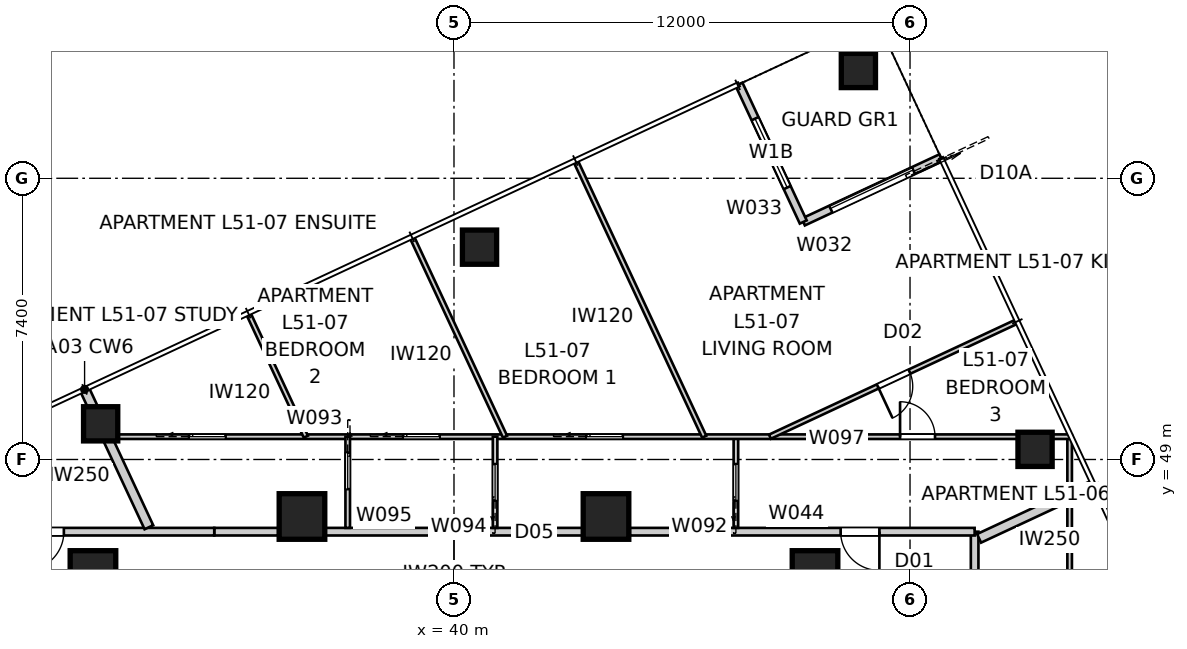
"""IFC4 building model, lengths in metres.
Left out: names, types, materials, properties, quantities, classifications, styles, units other than length and angle.
Written with IfcOpenShell. Run it as: python <this file> out.ifc"""

import sys

from ifc_helpers import new_model, si_unit, direction, frame, frame_2d, origin, origin_2d, place, context, subcontext, project, spatial, rectangle, extrude, element, fill, save


model = new_model("IFC4")
c1 = context("Model", 3, precision=1e-05, world=origin(), true_north=direction((0.0, 1.0)))
c2 = subcontext(c1, "Body", "Model", "MODEL_VIEW")
j1 = project(units=[si_unit("LENGTHUNIT", "METRE"), si_unit("PLANEANGLEUNIT", "RADIAN")], contexts=[c1])
p1 = place(None, origin())
s1 = spatial("IfcSite", under=j1, at=p1, CompositionType="ELEMENT")
p2 = place(p1, origin())
s2 = spatial("IfcBuilding", under=s1, at=p2, CompositionType="ELEMENT")
p3 = place(p2, frame((0.0, 0.0, 186.2)))
s3 = spatial("IfcBuildingStorey", under=s2, at=p3, CompositionType="ELEMENT", Elevation=186.2)
for number, where, z_axis, x_axis in (
    (1, (55.29, 49.267, 0.0), (0.0, 0.0, 1.0), (1.0, 0.0, 0.0)),
    (2, (50.641, 59.236, 0.0), (0.0, 0.0, 1.0), (1.0, 0.0, 0.0)),
    (3, (40.672, 54.588, 0.0), (0.0, 0.0, 1.0), (1.0, 0.0, 0.0)),
    (4, (30.702, 49.939, 0.0), (0.0, 0.0, 1.0), (1.0, 0.0, 0.0)),
):
    element("IfcColumn", number, at=place(p3, frame(where, z_axis=z_axis, x_axis=x_axis)), inside=s3, PredefinedType="COLUMN", context=c2, shape_type="SweptSolid", body=[
        extrude(rectangle(XDim=0.9, YDim=0.9, at=origin_2d()), origin(), (0.0, 0.0, 1.0), 3.4),
    ])
for number, where, z_axis, x_axis in (
    (5, (49.5, 46.0, 0.0), (0.0, 0.0, 1.0), (1.0, 0.0, 0.0)),
    (6, (44.0, 47.5, 0.0), (0.0, 0.0, 1.0), (1.0, 0.0, 0.0)),
    (7, (36.0, 47.5, 0.0), (0.0, 0.0, 1.0), (1.0, 0.0, 0.0)),
    (8, (30.5, 46.0, 0.0), (0.0, 0.0, 1.0), (1.0, 0.0, 0.0)),
):
    element("IfcColumn", number, at=place(p3, frame(where, z_axis=z_axis, x_axis=x_axis)), inside=s3, PredefinedType="COLUMN", context=c2, shape_type="SweptSolid", body=[
        extrude(rectangle(XDim=1.2, YDim=1.2, at=origin_2d()), origin(), (0.0, 0.0, 1.0), 3.4),
    ])
p4 = place(p3, frame((52.815, 56.94, 0.0), z_axis=(0.0, 0.0, 1.0), x_axis=(-0.906289140828, -0.422658246362, 0.0)))
e9 = element("IfcWall", 9, at=p4, inside=s3, PredefinedType="SOLIDWALL", context=c2, shape_type="SweptSolid", body=[
    extrude(rectangle(XDim=4.0, YDim=0.2, at=frame_2d((2.0, 0.0))), origin(), (0.0, 0.0, 1.0), 3.25),
])
p5 = place(p4, frame((0.8, 0.0, 0.0)))
e10 = element("IfcOpeningElement", 10, at=p5, cuts=e9, PredefinedType="OPENING", context=c2, shape_type="SweptSolid", body=[
    extrude(rectangle(XDim=2.4, YDim=2.1, at=frame_2d((1.2, 1.05))), frame((0.0, 0.11, 0.0), z_axis=(0.0, -1.0, 0.0), x_axis=(1.0, 0.0, 0.0)), (0.0, 0.0, 1.0), 0.22),
])
p6 = place(p3, frame((49.19, 55.25, 0.0), z_axis=(0.0, 0.0, 1.0), x_axis=(-0.422658246362, 0.906289140828, 0.0)))
e11 = element("IfcWall", 11, at=p6, inside=s3, PredefinedType="SOLIDWALL", context=c2, shape_type="SweptSolid", body=[
    extrude(rectangle(XDim=4.0, YDim=0.2, at=frame_2d((2.0, 0.0))), origin(), (0.0, 0.0, 1.0), 3.25),
])
p7 = place(p6, frame((1.0, 0.0, 0.45)))
e12 = element("IfcOpeningElement", 12, at=p7, cuts=e11, PredefinedType="OPENING", context=c2, shape_type="SweptSolid", body=[
    extrude(rectangle(XDim=2.0, YDim=1.8, at=frame_2d((1.0, 0.9))), frame((0.0, 0.11, 0.0), z_axis=(0.0, -1.0, 0.0), x_axis=(1.0, 0.0, 0.0)), (0.0, 0.0, 1.0), 0.22),
])
p8 = place(p3, frame((53.7, 13.3, 0.0), z_axis=(0.0, 0.0, 1.0), x_axis=(0.0, 1.0, 0.0)))
e13 = element("IfcWall", 13, at=p8, inside=s3, PredefinedType="PARTITIONING", context=c2, shape_type="SweptSolid", body=[
    extrude(rectangle(XDim=33.8, YDim=0.2, at=frame_2d((16.9, 0.0))), origin(), (0.0, 0.0, 1.0), 3.25),
])
p9 = place(p8, frame((6.984, 0.0, 0.0)))
e14 = element("IfcOpeningElement", 14, at=p9, cuts=e13, PredefinedType="OPENING", context=c2, shape_type="SweptSolid", body=[
    extrude(rectangle(XDim=1.02, YDim=2.34, at=frame_2d((0.51, 1.17))), frame((0.0, 0.11, 0.0), z_axis=(0.0, -1.0, 0.0), x_axis=(1.0, 0.0, 0.0)), (0.0, 0.0, 1.0), 0.22),
])
p10 = place(p8, frame((29.648, 0.0, 0.0)))
e15 = element("IfcOpeningElement", 15, at=p10, cuts=e13, PredefinedType="OPENING", context=c2, shape_type="SweptSolid", body=[
    extrude(rectangle(XDim=1.02, YDim=2.34, at=frame_2d((0.51, 1.17))), frame((0.0, 0.11, 0.0), z_axis=(0.0, -1.0, 0.0), x_axis=(1.0, 0.0, 0.0)), (0.0, 0.0, 1.0), 0.22),
])
p11 = place(p8, frame((15.16, 0.0, 0.0)))
e16 = element("IfcOpeningElement", 16, at=p11, cuts=e13, PredefinedType="OPENING", context=c2, shape_type="SweptSolid", body=[
    extrude(rectangle(XDim=1.02, YDim=2.34, at=frame_2d((0.51, 1.17))), frame((0.0, 0.11, 0.0), z_axis=(0.0, -1.0, 0.0), x_axis=(1.0, 0.0, 0.0)), (0.0, 0.0, 1.0), 0.22),
])
p12 = place(p3, frame((53.7, 47.1, 0.0), z_axis=(0.0, 0.0, 1.0), x_axis=(-1.0, 0.0, 0.0)))
e17 = element("IfcWall", 17, at=p12, inside=s3, PredefinedType="PARTITIONING", context=c2, shape_type="SweptSolid", body=[
    extrude(rectangle(XDim=7.392, YDim=0.2, at=frame_2d((3.696, 0.0))), origin(), (0.0, 0.0, 1.0), 3.25),
])
p13 = place(p12, frame((2.506, 0.0, 0.0)))
e18 = element("IfcOpeningElement", 18, at=p13, cuts=e17, PredefinedType="OPENING", context=c2, shape_type="SweptSolid", body=[
    extrude(rectangle(XDim=1.02, YDim=2.34, at=frame_2d((0.51, 1.17))), frame((0.0, 0.11, 0.0), z_axis=(0.0, -1.0, 0.0), x_axis=(1.0, 0.0, 0.0)), (0.0, 0.0, 1.0), 0.22),
])
p14 = place(p3, frame((46.308, 47.1, 0.0), z_axis=(0.0, 0.0, 1.0), x_axis=(-1.0, 0.0, 0.0)))
e19 = element("IfcWall", 19, at=p14, inside=s3, PredefinedType="PARTITIONING", context=c2, shape_type="SweptSolid", body=[
    extrude(rectangle(XDim=1.683, YDim=0.2, at=frame_2d((0.842, 0.0))), origin(), (0.0, 0.0, 1.0), 2.55),
])
p15 = place(p3, frame((44.625, 47.1, 0.0), z_axis=(0.0, 0.0, 1.0), x_axis=(-1.0, 0.0, 0.0)))
e20 = element("IfcWall", 20, at=p15, inside=s3, PredefinedType="PARTITIONING", context=c2, shape_type="SweptSolid", body=[
    extrude(rectangle(XDim=9.25, YDim=0.2, at=frame_2d((4.625, 0.0))), origin(), (0.0, 0.0, 1.0), 3.25),
])
p16 = place(p3, frame((35.375, 47.1, 0.0), z_axis=(0.0, 0.0, 1.0), x_axis=(-1.0, 0.0, 0.0)))
e21 = element("IfcWall", 21, at=p16, inside=s3, PredefinedType="PARTITIONING", context=c2, shape_type="SweptSolid", body=[
    extrude(rectangle(XDim=1.683, YDim=0.2, at=frame_2d((0.842, 0.0))), origin(), (0.0, 0.0, 1.0), 2.55),
])
p17 = place(p3, frame((33.692, 47.1, 0.0), z_axis=(0.0, 0.0, 1.0), x_axis=(-1.0, 0.0, 0.0)))
e22 = element("IfcWall", 22, at=p17, inside=s3, PredefinedType="PARTITIONING", context=c2, shape_type="SweptSolid", body=[
    extrude(rectangle(XDim=7.392, YDim=0.2, at=frame_2d((3.696, 0.0))), origin(), (0.0, 0.0, 1.0), 3.25),
])
p18 = place(p17, frame((3.957, 0.0, 0.0)))
e23 = element("IfcOpeningElement", 23, at=p18, cuts=e22, PredefinedType="OPENING", context=c2, shape_type="SweptSolid", body=[
    extrude(rectangle(XDim=1.02, YDim=2.34, at=frame_2d((0.51, 1.17))), frame((0.0, 0.11, 0.0), z_axis=(0.0, -1.0, 0.0), x_axis=(1.0, 0.0, 0.0)), (0.0, 0.0, 1.0), 0.22),
])
p19 = place(p3, frame((30.28, 50.845, 0.0), z_axis=(0.0, 0.0, 1.0), x_axis=(0.422605017068, -0.906313963011, 0.0)))
e24 = element("IfcWall", 24, at=p19, inside=s3, PredefinedType="PARTITIONING", context=c2, shape_type="SweptSolid", body=[
    extrude(rectangle(XDim=4.003, YDim=0.25, at=frame_2d((2.002, 0.0))), origin(), (0.0, 0.0, 1.0), 3.25),
])
p20 = place(p3, frame((56.83, 48.33, 0.0), z_axis=(0.0, 0.0, 1.0), x_axis=(-0.906310647924, -0.422612126495, 0.0)))
e25 = element("IfcWall", 25, at=p20, inside=s3, PredefinedType="PARTITIONING", context=c2, shape_type="SweptSolid", body=[
    extrude(rectangle(XDim=3.325, YDim=0.25, at=frame_2d((1.663, 0.0))), origin(), (0.0, 0.0, 1.0), 3.25),
])
p21 = place(p3, frame((56.2, 49.642, 0.0), z_axis=(0.0, 0.0, 1.0), x_axis=(0.0, -1.0, 0.0)))
e26 = element("IfcWall", 26, at=p21, inside=s3, PredefinedType="PARTITIONING", context=c2, shape_type="SweptSolid", body=[
    extrude(rectangle(XDim=37.421, YDim=0.12, at=frame_2d((18.71, 0.0))), origin(), (0.0, 0.0, 1.0), 2.55),
])
p22 = place(p21, frame((27.488, 0.0, 0.0)))
e27 = element("IfcOpeningElement", 27, at=p22, cuts=e26, PredefinedType="OPENING", context=c2, shape_type="SweptSolid", body=[
    extrude(rectangle(XDim=0.92, YDim=2.34, at=frame_2d((0.46, 1.17))), frame((0.0, 0.07, 0.0), z_axis=(0.0, -1.0, 0.0), x_axis=(1.0, 0.0, 0.0)), (0.0, 0.0, 1.0), 0.14),
])
p23 = place(p21, frame((5.08, 0.0, 0.0)))
e28 = element("IfcOpeningElement", 28, at=p23, cuts=e26, PredefinedType="OPENING", context=c2, shape_type="SweptSolid", body=[
    extrude(rectangle(XDim=0.92, YDim=2.34, at=frame_2d((0.46, 1.17))), frame((0.0, 0.07, 0.0), z_axis=(0.0, -1.0, 0.0), x_axis=(1.0, 0.0, 0.0)), (0.0, 0.0, 1.0), 0.14),
])
p24 = place(p21, frame((19.592, 0.0, 0.0)))
e29 = element("IfcOpeningElement", 29, at=p24, cuts=e26, PredefinedType="OPENING", context=c2, shape_type="SweptSolid", body=[
    extrude(rectangle(XDim=0.92, YDim=2.34, at=frame_2d((0.46, 1.17))), frame((0.0, 0.07, 0.0), z_axis=(0.0, -1.0, 0.0), x_axis=(1.0, 0.0, 0.0)), (0.0, 0.0, 1.0), 0.14),
])
p25 = place(p3, frame((47.418, 47.2, 0.0), z_axis=(0.0, 0.0, 1.0), x_axis=(0.0, 1.0, 0.0)))
e30 = element("IfcWall", 30, at=p25, inside=s3, PredefinedType="PARTITIONING", context=c2, shape_type="SweptSolid", body=[
    extrude(rectangle(XDim=2.4, YDim=0.12, at=frame_2d((1.2, 0.0))), origin(), (0.0, 0.0, 1.0), 3.25),
])
p26 = place(p25, frame((0.72, 0.0, 0.0)))
e31 = element("IfcOpeningElement", 31, at=p26, cuts=e30, PredefinedType="OPENING", context=c2, shape_type="SweptSolid", body=[
    extrude(rectangle(XDim=0.96, YDim=2.1, at=frame_2d((0.48, 1.05))), frame((0.0, 0.07, 0.0), z_axis=(0.0, -1.0, 0.0), x_axis=(1.0, 0.0, 0.0)), (0.0, 0.0, 1.0), 0.14),
])
p27 = place(p3, frame((30.86, 49.6, 0.0), z_axis=(0.0, 0.0, 1.0), x_axis=(1.0, 0.0, 0.0)))
e32 = element("IfcWall", 32, at=p27, inside=s3, PredefinedType="PARTITIONING", context=c2, shape_type="SweptSolid", body=[
    extrude(rectangle(XDim=25.333, YDim=0.12, at=frame_2d((12.667, 0.0))), origin(), (0.0, 0.0, 1.0), 3.25),
])
p28 = place(p27, frame((20.877, 0.0, 0.0)))
e33 = element("IfcOpeningElement", 33, at=p28, cuts=e32, PredefinedType="OPENING", context=c2, shape_type="SweptSolid", body=[
    extrude(rectangle(XDim=0.92, YDim=2.34, at=frame_2d((0.46, 1.17))), frame((0.0, 0.07, 0.0), z_axis=(0.0, -1.0, 0.0), x_axis=(1.0, 0.0, 0.0)), (0.0, 0.0, 1.0), 0.14),
])
p29 = place(p27, frame((12.623, 0.0, 0.0)))
e34 = element("IfcOpeningElement", 34, at=p29, cuts=e32, PredefinedType="OPENING", context=c2, shape_type="SweptSolid", body=[
    extrude(rectangle(XDim=0.96, YDim=2.1, at=frame_2d((0.48, 1.05))), frame((0.0, 0.07, 0.0), z_axis=(0.0, -1.0, 0.0), x_axis=(1.0, 0.0, 0.0)), (0.0, 0.0, 1.0), 0.14),
])
p30 = place(p27, frame((7.802, 0.0, 0.0)))
e35 = element("IfcOpeningElement", 35, at=p30, cuts=e32, PredefinedType="OPENING", context=c2, shape_type="SweptSolid", body=[
    extrude(rectangle(XDim=0.96, YDim=2.1, at=frame_2d((0.48, 1.05))), frame((0.0, 0.07, 0.0), z_axis=(0.0, -1.0, 0.0), x_axis=(1.0, 0.0, 0.0)), (0.0, 0.0, 1.0), 0.14),
])
p31 = place(p27, frame((2.168, 0.0, 0.0)))
e36 = element("IfcOpeningElement", 36, at=p31, cuts=e32, PredefinedType="OPENING", context=c2, shape_type="SweptSolid", body=[
    extrude(rectangle(XDim=0.96, YDim=2.1, at=frame_2d((0.48, 1.05))), frame((0.0, 0.07, 0.0), z_axis=(0.0, -1.0, 0.0), x_axis=(1.0, 0.0, 0.0)), (0.0, 0.0, 1.0), 0.14),
])
p32 = place(p3, frame((41.082, 47.2, 0.0), z_axis=(0.0, 0.0, 1.0), x_axis=(0.0, 1.0, 0.0)))
e37 = element("IfcWall", 37, at=p32, inside=s3, PredefinedType="PARTITIONING", context=c2, shape_type="SweptSolid", body=[
    extrude(rectangle(XDim=2.4, YDim=0.12, at=frame_2d((1.2, 0.0))), origin(), (0.0, 0.0, 1.0), 3.25),
])
p33 = place(p32, frame((0.72, 0.0, 0.0)))
e38 = element("IfcOpeningElement", 38, at=p33, cuts=e37, PredefinedType="OPENING", context=c2, shape_type="SweptSolid", body=[
    extrude(rectangle(XDim=0.96, YDim=2.1, at=frame_2d((0.48, 1.05))), frame((0.0, 0.07, 0.0), z_axis=(0.0, -1.0, 0.0), x_axis=(1.0, 0.0, 0.0)), (0.0, 0.0, 1.0), 0.14),
])
p34 = place(p3, frame((37.204, 49.6, 0.0), z_axis=(0.0, 0.0, 1.0), x_axis=(0.0, -1.0, 0.0)))
e39 = element("IfcWall", 39, at=p34, inside=s3, PredefinedType="PARTITIONING", context=c2, shape_type="SweptSolid", body=[
    extrude(rectangle(XDim=2.4, YDim=0.12, at=frame_2d((1.2, 0.0))), origin(), (0.0, 0.0, 1.0), 3.25),
])
p35 = place(p34, frame((0.42, 0.0, 0.0)))
e40 = element("IfcOpeningElement", 40, at=p35, cuts=e39, PredefinedType="OPENING", context=c2, shape_type="SweptSolid", body=[
    extrude(rectangle(XDim=0.96, YDim=2.1, at=frame_2d((0.48, 1.05))), frame((0.0, 0.07, 0.0), z_axis=(0.0, -1.0, 0.0), x_axis=(1.0, 0.0, 0.0)), (0.0, 0.0, 1.0), 0.14),
])
p36 = place(p3, frame((46.583, 49.6, 0.0), z_axis=(0.0, 0.0, 1.0), x_axis=(-0.422640876946, 0.90629724105, 0.0)))
e41 = element("IfcWall", 41, at=p36, inside=s3, PredefinedType="PARTITIONING", context=c2, shape_type="SweptSolid", body=[
    extrude(rectangle(XDim=7.979, YDim=0.12, at=frame_2d((3.989, 0.0))), origin(), (0.0, 0.0, 1.0), 3.25),
])
p37 = place(p3, frame((54.787, 52.618, 0.0), z_axis=(0.0, 0.0, 1.0), x_axis=(-0.906317589158, -0.422597240388, 0.0)))
e42 = element("IfcWall", 42, at=p37, inside=s3, PredefinedType="PARTITIONING", context=c2, shape_type="SweptSolid", body=[
    extrude(rectangle(XDim=7.142, YDim=0.12, at=frame_2d((3.571, 0.0))), origin(), (0.0, 0.0, 1.0), 3.25),
])
p38 = place(p37, frame((3.091, 0.0, 0.0)))
e43 = element("IfcOpeningElement", 43, at=p38, cuts=e42, PredefinedType="OPENING", context=c2, shape_type="SweptSolid", body=[
    extrude(rectangle(XDim=0.92, YDim=2.34, at=frame_2d((0.46, 1.17))), frame((0.0, 0.07, 0.0), z_axis=(0.0, -1.0, 0.0), x_axis=(1.0, 0.0, 0.0)), (0.0, 0.0, 1.0), 0.14),
])
p39 = place(p3, frame((41.343, 49.6, 0.0), z_axis=(0.0, 0.0, 1.0), x_axis=(-0.422648925879, 0.906293487483, 0.0)))
e44 = element("IfcWall", 44, at=p39, inside=s3, PredefinedType="PARTITIONING", context=c2, shape_type="SweptSolid", body=[
    extrude(rectangle(XDim=5.764, YDim=0.12, at=frame_2d((2.882, 0.0))), origin(), (0.0, 0.0, 1.0), 3.25),
])
p40 = place(p3, frame((36.101, 49.6, 0.0), z_axis=(0.0, 0.0, 1.0), x_axis=(-0.42263686638, 0.906299111318, 0.0)))
e45 = element("IfcWall", 45, at=p40, inside=s3, PredefinedType="PARTITIONING", context=c2, shape_type="SweptSolid", body=[
    extrude(rectangle(XDim=3.549, YDim=0.12, at=frame_2d((1.774, 0.0))), origin(), (0.0, 0.0, 1.0), 3.25),
])
p41 = place(p5, origin())
e46 = element("IfcDoor", 46, at=p41, inside=s3, OperationType="SLIDING_TO_LEFT", PredefinedType="DOOR", context=c2, shape_type="SweptSolid", body=[
    extrude(rectangle(XDim=2.4, YDim=2.1, at=frame_2d((1.2, 1.05))), frame((0.0, 0.025, 0.0), z_axis=(0.0, -1.0, 0.0), x_axis=(1.0, 0.0, 0.0)), (0.0, 0.0, 1.0), 0.05),
])
fill(e10, e46)
p42 = place(p7, origin())
e47 = element("IfcWindow", 47, at=p42, inside=s3, PartitioningType="SINGLE_PANEL", PredefinedType="WINDOW", context=c2, shape_type="SweptSolid", body=[
    extrude(rectangle(XDim=2.0, YDim=1.8, at=frame_2d((1.0, 0.9))), frame((0.0, 0.03, 0.0), z_axis=(0.0, -1.0, 0.0), x_axis=(1.0, 0.0, 0.0)), (0.0, 0.0, 1.0), 0.06),
])
fill(e12, e47)
p43 = place(p13, origin())
e48 = element("IfcDoor", 48, at=p43, inside=s3, OperationType="SINGLE_SWING_LEFT", PredefinedType="DOOR", context=c2, shape_type="SweptSolid", body=[
    extrude(rectangle(XDim=1.02, YDim=2.34, at=frame_2d((0.51, 1.17))), frame((0.0, 0.025, 0.0), z_axis=(0.0, -1.0, 0.0), x_axis=(1.0, 0.0, 0.0)), (0.0, 0.0, 1.0), 0.05),
])
fill(e18, e48)
p44 = place(p18, origin())
e49 = element("IfcDoor", 49, at=p44, inside=s3, OperationType="SINGLE_SWING_RIGHT", PredefinedType="DOOR", context=c2, shape_type="SweptSolid", body=[
    extrude(rectangle(XDim=1.02, YDim=2.34, at=frame_2d((0.51, 1.17))), frame((0.0, 0.025, 0.0), z_axis=(0.0, -1.0, 0.0), x_axis=(1.0, 0.0, 0.0)), (0.0, 0.0, 1.0), 0.05),
])
fill(e23, e49)
p45 = place(p28, origin())
e50 = element("IfcDoor", 50, at=p45, inside=s3, OperationType="SINGLE_SWING_LEFT", PredefinedType="DOOR", context=c2, shape_type="SweptSolid", body=[
    extrude(rectangle(XDim=0.92, YDim=2.34, at=frame_2d((0.46, 1.17))), frame((0.0, 0.025, 0.0), z_axis=(0.0, -1.0, 0.0), x_axis=(1.0, 0.0, 0.0)), (0.0, 0.0, 1.0), 0.05),
])
fill(e33, e50)
p46 = place(p26, origin())
e51 = element("IfcDoor", 51, at=p46, inside=s3, OperationType="SLIDING_TO_LEFT", PredefinedType="DOOR", context=c2, shape_type="SweptSolid", body=[
    extrude(rectangle(XDim=0.96, YDim=2.1, at=frame_2d((0.48, 1.05))), frame((0.0, 0.025, 0.0), z_axis=(0.0, -1.0, 0.0), x_axis=(1.0, 0.0, 0.0)), (0.0, 0.0, 1.0), 0.05),
])
fill(e31, e51)
p47 = place(p29, origin())
e52 = element("IfcDoor", 52, at=p47, inside=s3, OperationType="SLIDING_TO_LEFT", PredefinedType="DOOR", context=c2, shape_type="SweptSolid", body=[
    extrude(rectangle(XDim=0.96, YDim=2.1, at=frame_2d((0.48, 1.05))), frame((0.0, 0.025, 0.0), z_axis=(0.0, -1.0, 0.0), x_axis=(1.0, 0.0, 0.0)), (0.0, 0.0, 1.0), 0.05),
])
fill(e34, e52)
p48 = place(p33, origin())
e53 = element("IfcDoor", 53, at=p48, inside=s3, OperationType="SLIDING_TO_LEFT", PredefinedType="DOOR", context=c2, shape_type="SweptSolid", body=[
    extrude(rectangle(XDim=0.96, YDim=2.1, at=frame_2d((0.48, 1.05))), frame((0.0, 0.025, 0.0), z_axis=(0.0, -1.0, 0.0), x_axis=(1.0, 0.0, 0.0)), (0.0, 0.0, 1.0), 0.05),
])
fill(e38, e53)
p49 = place(p30, origin())
e54 = element("IfcDoor", 54, at=p49, inside=s3, OperationType="SLIDING_TO_LEFT", PredefinedType="DOOR", context=c2, shape_type="SweptSolid", body=[
    extrude(rectangle(XDim=0.96, YDim=2.1, at=frame_2d((0.48, 1.05))), frame((0.0, 0.025, 0.0), z_axis=(0.0, -1.0, 0.0), x_axis=(1.0, 0.0, 0.0)), (0.0, 0.0, 1.0), 0.05),
])
fill(e35, e54)
p50 = place(p35, origin())
e55 = element("IfcDoor", 55, at=p50, inside=s3, OperationType="SLIDING_TO_LEFT", PredefinedType="DOOR", context=c2, shape_type="SweptSolid", body=[
    extrude(rectangle(XDim=0.96, YDim=2.1, at=frame_2d((0.48, 1.05))), frame((0.0, 0.025, 0.0), z_axis=(0.0, -1.0, 0.0), x_axis=(1.0, 0.0, 0.0)), (0.0, 0.0, 1.0), 0.05),
])
fill(e40, e55)
p51 = place(p31, origin())
e56 = element("IfcDoor", 56, at=p51, inside=s3, OperationType="SLIDING_TO_LEFT", PredefinedType="DOOR", context=c2, shape_type="SweptSolid", body=[
    extrude(rectangle(XDim=0.96, YDim=2.1, at=frame_2d((0.48, 1.05))), frame((0.0, 0.025, 0.0), z_axis=(0.0, -1.0, 0.0), x_axis=(1.0, 0.0, 0.0)), (0.0, 0.0, 1.0), 0.05),
])
fill(e36, e56)
p52 = place(p38, origin())
e57 = element("IfcDoor", 57, at=p52, inside=s3, OperationType="SINGLE_SWING_RIGHT", PredefinedType="DOOR", context=c2, shape_type="SweptSolid", body=[
    extrude(rectangle(XDim=0.92, YDim=2.34, at=frame_2d((0.46, 1.17))), frame((0.0, 0.025, 0.0), z_axis=(0.0, -1.0, 0.0), x_axis=(1.0, 0.0, 0.0)), (0.0, 0.0, 1.0), 0.05),
])
fill(e43, e57)
save(model, sys.argv[1])
